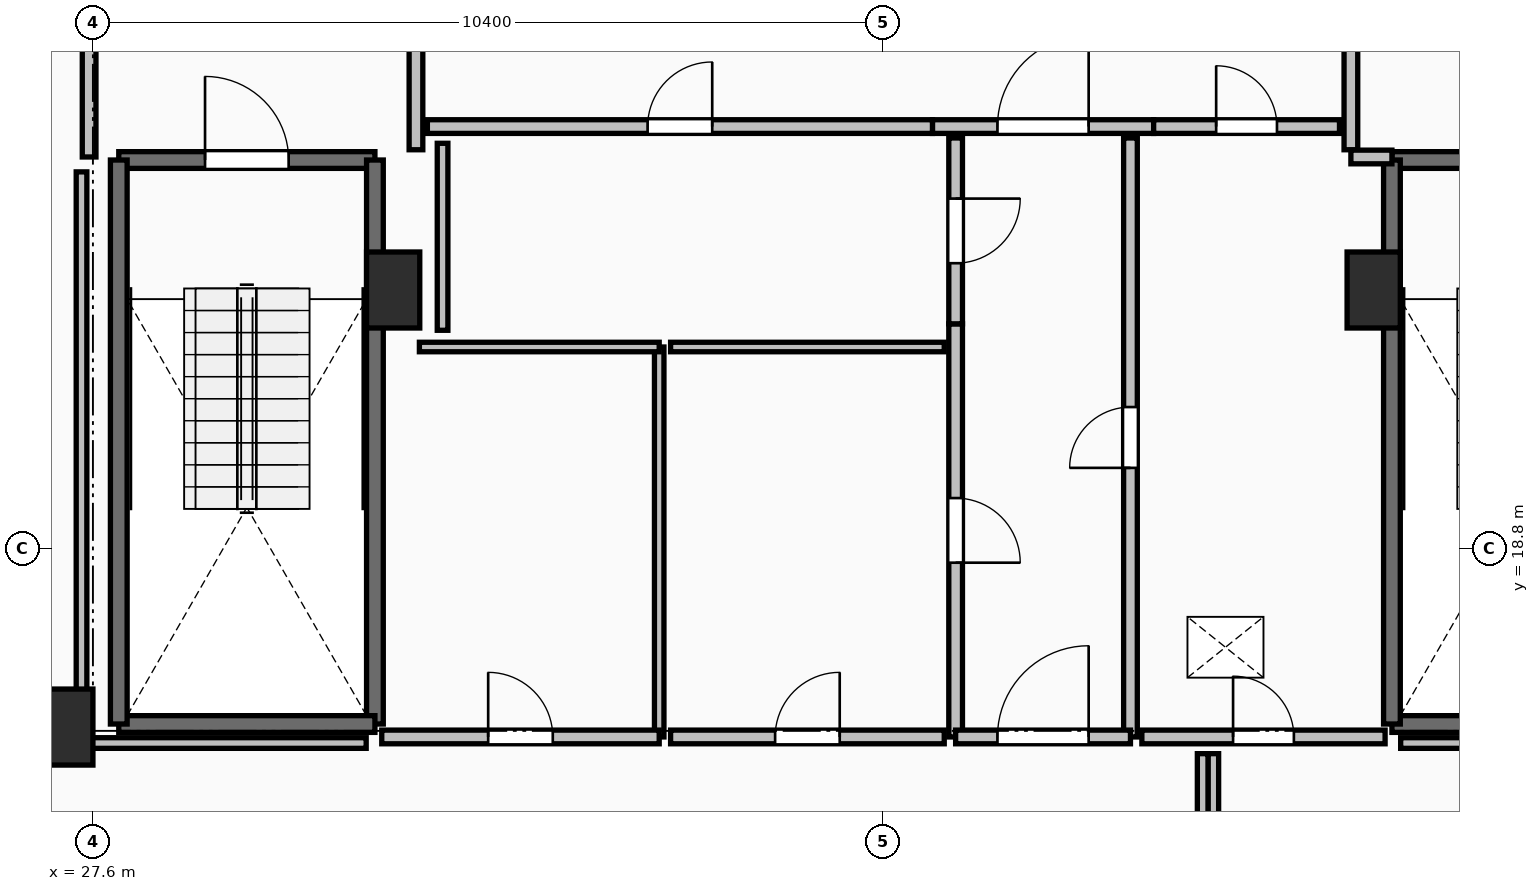
"""IFC4 building model, lengths in metres.
Left out: names, types, materials, properties, quantities, classifications, styles, units other than length and angle.
Written with IfcOpenShell. Run it as: python <this file> out.ifc"""

import sys

from ifc_helpers import new_model, si_unit, direction, frame, frame_2d, origin, origin_2d, place, context, subcontext, project, spatial, rectangle, extrude, element, fill, save


model = new_model("IFC4")
c1 = context("Model", 3, precision=1e-05, world=origin(), true_north=direction((0.0, 1.0)))
c2 = subcontext(c1, "Body", "Model", "MODEL_VIEW")
j1 = project(units=[si_unit("LENGTHUNIT", "METRE"), si_unit("PLANEANGLEUNIT", "RADIAN")], contexts=[c1])
p1 = place(None, origin())
s1 = spatial("IfcSite", under=j1, at=p1, CompositionType="ELEMENT")
p2 = place(p1, origin())
s2 = spatial("IfcBuilding", under=s1, at=p2, CompositionType="ELEMENT")
p3 = place(p2, frame((0.0, 0.0, 262.65)))
s3 = spatial("IfcBuildingStorey", under=s2, at=p3, CompositionType="ELEMENT", Elevation=262.65)
for number, where, z_axis, x_axis in (
    (1, (27.25, 16.45, 0.0), (0.0, 0.0, 1.0), (1.0, 0.0, 0.0)),
    (2, (31.55, 22.2, 0.0), (0.0, 0.0, 1.0), (1.0, 0.0, 0.0)),
    (3, (44.45, 22.2, 0.0), (0.0, 0.0, 1.0), (1.0, 0.0, 0.0)),
):
    element("IfcColumn", number, at=place(p3, frame(where, z_axis=z_axis, x_axis=x_axis)), inside=s3, PredefinedType="PILASTER", context=c2, shape_type="SweptSolid", body=[
        extrude(rectangle(XDim=0.7, YDim=1.0, at=origin_2d()), origin(), (0.0, 0.0, 1.0), 3.55),
    ])
p4 = place(p3, frame((27.94, 23.91, 0.0), z_axis=(0.0, 0.0, 1.0), x_axis=(1.0, 0.0, 0.0)))
e4 = element("IfcWall", 4, at=p4, inside=s3, PredefinedType="SOLIDWALL", context=c2, shape_type="SweptSolid", body=[
    extrude(rectangle(XDim=3.37, YDim=0.22, at=frame_2d((1.685, 0.0))), origin(), (0.0, 0.0, 1.0), 3.29),
])
p5 = place(p4, frame((1.135, 0.0, 0.0)))
e5 = element("IfcOpeningElement", 5, at=p5, cuts=e4, PredefinedType="OPENING", context=c2, shape_type="SweptSolid", body=[
    extrude(rectangle(XDim=1.1, YDim=2.15, at=frame_2d((0.55, 1.075))), frame((0.0, 0.125, 0.0), z_axis=(0.0, -1.0, 0.0), x_axis=(1.0, 0.0, 0.0)), (0.0, 0.0, 1.0), 0.25),
])
p6 = place(p3, frame((31.31, 23.91, 0.0), z_axis=(0.0, 0.0, 1.0), x_axis=(0.0, -1.0, 0.0)))
e6 = element("IfcWall", 6, at=p6, inside=s3, PredefinedType="SOLIDWALL", context=c2, shape_type="SweptSolid", body=[
    extrude(rectangle(XDim=7.42, YDim=0.22, at=frame_2d((3.71, 0.0))), origin(), (0.0, 0.0, 1.0), 3.29),
])
p7 = place(p3, frame((31.31, 16.49, 0.0), z_axis=(0.0, 0.0, 1.0), x_axis=(-1.0, 0.0, 0.0)))
e7 = element("IfcWall", 7, at=p7, inside=s3, PredefinedType="SOLIDWALL", context=c2, shape_type="SweptSolid", body=[
    extrude(rectangle(XDim=3.37, YDim=0.22, at=frame_2d((1.685, 0.0))), origin(), (0.0, 0.0, 1.0), 3.29),
])
p8 = place(p3, frame((27.94, 16.49, 0.0), z_axis=(0.0, 0.0, 1.0), x_axis=(0.0, 1.0, 0.0)))
e8 = element("IfcWall", 8, at=p8, inside=s3, PredefinedType="SOLIDWALL", context=c2, shape_type="SweptSolid", body=[
    extrude(rectangle(XDim=7.42, YDim=0.22, at=frame_2d((3.71, 0.0))), origin(), (0.0, 0.0, 1.0), 3.29),
])
p9 = place(p3, frame((44.69, 23.91, 0.0), z_axis=(0.0, 0.0, 1.0), x_axis=(1.0, 0.0, 0.0)))
e9 = element("IfcWall", 9, at=p9, inside=s3, PredefinedType="SOLIDWALL", context=c2, shape_type="SweptSolid", body=[
    extrude(rectangle(XDim=3.37, YDim=0.22, at=frame_2d((1.685, 0.0))), origin(), (0.0, 0.0, 1.0), 3.29),
])
p10 = place(p9, frame((1.135, 0.0, 0.0)))
e10 = element("IfcOpeningElement", 10, at=p10, cuts=e9, PredefinedType="OPENING", context=c2, shape_type="SweptSolid", body=[
    extrude(rectangle(XDim=1.1, YDim=2.15, at=frame_2d((0.55, 1.075))), frame((0.0, 0.125, 0.0), z_axis=(0.0, -1.0, 0.0), x_axis=(1.0, 0.0, 0.0)), (0.0, 0.0, 1.0), 0.25),
])
p11 = place(p3, frame((48.06, 16.49, 0.0), z_axis=(0.0, 0.0, 1.0), x_axis=(-1.0, 0.0, 0.0)))
e11 = element("IfcWall", 11, at=p11, inside=s3, PredefinedType="SOLIDWALL", context=c2, shape_type="SweptSolid", body=[
    extrude(rectangle(XDim=3.37, YDim=0.22, at=frame_2d((1.685, 0.0))), origin(), (0.0, 0.0, 1.0), 3.29),
])
p12 = place(p3, frame((44.69, 16.49, 0.0), z_axis=(0.0, 0.0, 1.0), x_axis=(0.0, 1.0, 0.0)))
e12 = element("IfcWall", 12, at=p12, inside=s3, PredefinedType="SOLIDWALL", context=c2, shape_type="SweptSolid", body=[
    extrude(rectangle(XDim=7.42, YDim=0.22, at=frame_2d((3.71, 0.0))), origin(), (0.0, 0.0, 1.0), 3.29),
])
p13 = place(p3, frame((31.85, 24.045, 0.0), z_axis=(0.0, 0.0, 1.0), x_axis=(0.0, 1.0, 0.0)))
e13 = element("IfcWall", 13, at=p13, inside=s3, PredefinedType="PARTITIONING", context=c2, shape_type="SweptSolid", body=[
    extrude(rectangle(XDim=3.91, YDim=0.18, at=frame_2d((1.955, 0.0))), origin(), (0.0, 0.0, 1.0), 3.29),
])
p14 = place(p13, frame((1.355, 0.0, 0.0)))
e14 = element("IfcOpeningElement", 14, at=p14, cuts=e13, PredefinedType="OPENING", context=c2, shape_type="SweptSolid", body=[
    extrude(rectangle(XDim=1.2, YDim=2.15, at=frame_2d((0.6, 1.075))), frame((0.0, 0.105, 0.0), z_axis=(0.0, -1.0, 0.0), x_axis=(1.0, 0.0, 0.0)), (0.0, 0.0, 1.0), 0.21),
])
p15 = place(p3, frame((27.55, 28.0, 0.0), z_axis=(0.0, 0.0, 1.0), x_axis=(0.0, -1.0, 0.0)))
e15 = element("IfcWall", 15, at=p15, inside=s3, PredefinedType="PARTITIONING", context=c2, shape_type="SweptSolid", body=[
    extrude(rectangle(XDim=4.05, YDim=0.18, at=frame_2d((2.025, 0.0))), origin(), (0.0, 0.0, 1.0), 3.29),
])
p16 = place(p15, frame((1.425, 0.0, 0.0)))
e16 = element("IfcOpeningElement", 16, at=p16, cuts=e15, PredefinedType="OPENING", context=c2, shape_type="SweptSolid", body=[
    extrude(rectangle(XDim=1.2, YDim=2.15, at=frame_2d((0.6, 1.075))), frame((0.0, 0.105, 0.0), z_axis=(0.0, -1.0, 0.0), x_axis=(1.0, 0.0, 0.0)), (0.0, 0.0, 1.0), 0.21),
])
p17 = place(p3, frame((44.15, 27.955, 0.0), z_axis=(0.0, 0.0, 1.0), x_axis=(0.0, -1.0, 0.0)))
e17 = element("IfcWall", 17, at=p17, inside=s3, PredefinedType="PARTITIONING", context=c2, shape_type="SweptSolid", body=[
    extrude(rectangle(XDim=3.91, YDim=0.18, at=frame_2d((1.955, 0.0))), origin(), (0.0, 0.0, 1.0), 3.29),
])
p18 = place(p17, frame((1.355, 0.0, 0.0)))
e18 = element("IfcOpeningElement", 18, at=p18, cuts=e17, PredefinedType="OPENING", context=c2, shape_type="SweptSolid", body=[
    extrude(rectangle(XDim=1.2, YDim=2.15, at=frame_2d((0.6, 1.075))), frame((0.0, 0.105, 0.0), z_axis=(0.0, -1.0, 0.0), x_axis=(1.0, 0.0, 0.0)), (0.0, 0.0, 1.0), 0.21),
])
p19 = place(p3, frame((44.15, 23.95, 0.0), z_axis=(0.0, 0.0, 1.0), x_axis=(1.0, 0.0, 0.0)))
e19 = element("IfcWall", 19, at=p19, inside=s3, PredefinedType="PARTITIONING", context=c2, shape_type="SweptSolid", body=[
    extrude(rectangle(XDim=0.54, YDim=0.18, at=frame_2d((0.27, 0.0))), origin(), (0.0, 0.0, 1.0), 3.29),
])
p20 = place(p3, frame((38.645, 24.35, 0.0), z_axis=(0.0, 0.0, 1.0), x_axis=(1.0, 0.0, 0.0)))
e20 = element("IfcWall", 20, at=p20, inside=s3, PredefinedType="PARTITIONING", context=c2, shape_type="SweptSolid", body=[
    extrude(rectangle(XDim=2.91, YDim=0.18, at=frame_2d((1.455, 0.0))), origin(), (0.0, 0.0, 1.0), 3.29),
])
p21 = place(p20, frame((0.855, 0.0, 0.0)))
e21 = element("IfcOpeningElement", 21, at=p21, cuts=e20, PredefinedType="OPENING", context=c2, shape_type="SweptSolid", body=[
    extrude(rectangle(XDim=1.2, YDim=2.15, at=frame_2d((0.6, 1.075))), frame((0.0, 0.105, 0.0), z_axis=(0.0, -1.0, 0.0), x_axis=(1.0, 0.0, 0.0)), (0.0, 0.0, 1.0), 0.21),
])
p22 = place(p3, frame((41.555, 24.35, 0.0), z_axis=(0.0, 0.0, 1.0), x_axis=(1.0, 0.0, 0.0)))
e22 = element("IfcWall", 22, at=p22, inside=s3, PredefinedType="PARTITIONING", context=c2, shape_type="SweptSolid", body=[
    extrude(rectangle(XDim=2.445, YDim=0.18, at=frame_2d((1.223, 0.0))), origin(), (0.0, 0.0, 1.0), 3.29),
])
p23 = place(p22, frame((0.823, 0.0, 0.0)))
e23 = element("IfcOpeningElement", 23, at=p23, cuts=e22, PredefinedType="OPENING", context=c2, shape_type="SweptSolid", body=[
    extrude(rectangle(XDim=0.8, YDim=2.05, at=frame_2d((0.4, 1.025))), frame((0.0, 0.105, 0.0), z_axis=(0.0, -1.0, 0.0), x_axis=(1.0, 0.0, 0.0)), (0.0, 0.0, 1.0), 0.21),
])
p24 = place(p3, frame((32.0, 24.35, 0.0), z_axis=(0.0, 0.0, 1.0), x_axis=(1.0, 0.0, 0.0)))
e24 = element("IfcWall", 24, at=p24, inside=s3, PredefinedType="PARTITIONING", context=c2, shape_type="SweptSolid", body=[
    extrude(rectangle(XDim=6.645, YDim=0.18, at=frame_2d((3.323, 0.0))), origin(), (0.0, 0.0, 1.0), 3.29),
])
p25 = place(p24, frame((2.897, 0.0, 0.0)))
e25 = element("IfcOpeningElement", 25, at=p25, cuts=e24, PredefinedType="OPENING", context=c2, shape_type="SweptSolid", body=[
    extrude(rectangle(XDim=0.85, YDim=2.1, at=frame_2d((0.425, 1.05))), frame((0.0, 0.105, 0.0), z_axis=(0.0, -1.0, 0.0), x_axis=(1.0, 0.0, 0.0)), (0.0, 0.0, 1.0), 0.21),
])
p26 = place(p3, frame((41.25, 16.32, 0.0), z_axis=(0.0, 0.0, 1.0), x_axis=(0.0, 1.0, 0.0)))
e26 = element("IfcWall", 26, at=p26, inside=s3, PredefinedType="PARTITIONING", context=c2, shape_type="SweptSolid", body=[
    extrude(rectangle(XDim=7.88, YDim=0.18, at=frame_2d((3.94, 0.0))), origin(), (0.0, 0.0, 1.0), 2.482),
])
p27 = place(p26, frame((3.54, 0.0, 0.0)))
e27 = element("IfcOpeningElement", 27, at=p27, cuts=e26, PredefinedType="OPENING", context=c2, shape_type="SweptSolid", body=[
    extrude(rectangle(XDim=0.8, YDim=2.05, at=frame_2d((0.4, 1.025))), frame((0.0, 0.105, 0.0), z_axis=(0.0, -1.0, 0.0), x_axis=(1.0, 0.0, 0.0)), (0.0, 0.0, 1.0), 0.21),
])
p28 = place(p3, frame((38.95, 21.755, 0.0), z_axis=(0.0, 0.0, 1.0), x_axis=(0.0, -1.0, 0.0)))
e28 = element("IfcWall", 28, at=p28, inside=s3, PredefinedType="PARTITIONING", context=c2, shape_type="SweptSolid", body=[
    extrude(rectangle(XDim=5.435, YDim=0.18, at=frame_2d((2.717, 0.0))), origin(), (0.0, 0.0, 1.0), 3.29),
])
p29 = place(p28, frame((2.292, 0.0, 0.0)))
e29 = element("IfcOpeningElement", 29, at=p29, cuts=e28, PredefinedType="OPENING", context=c2, shape_type="SweptSolid", body=[
    extrude(rectangle(XDim=0.85, YDim=2.1, at=frame_2d((0.425, 1.05))), frame((0.0, 0.105, 0.0), z_axis=(0.0, -1.0, 0.0), x_axis=(1.0, 0.0, 0.0)), (0.0, 0.0, 1.0), 0.21),
])
p30 = place(p3, frame((38.95, 24.2, 0.0), z_axis=(0.0, 0.0, 1.0), x_axis=(0.0, -1.0, 0.0)))
e30 = element("IfcWall", 30, at=p30, inside=s3, PredefinedType="PARTITIONING", context=c2, shape_type="SweptSolid", body=[
    extrude(rectangle(XDim=2.445, YDim=0.18, at=frame_2d((1.223, 0.0))), origin(), (0.0, 0.0, 1.0), 2.482),
])
p31 = place(p30, frame((0.798, 0.0, 0.0)))
e31 = element("IfcOpeningElement", 31, at=p31, cuts=e30, PredefinedType="OPENING", context=c2, shape_type="SweptSolid", body=[
    extrude(rectangle(XDim=0.85, YDim=2.1, at=frame_2d((0.425, 1.05))), frame((0.0, 0.105, 0.0), z_axis=(0.0, -1.0, 0.0), x_axis=(1.0, 0.0, 0.0)), (0.0, 0.0, 1.0), 0.21),
])
p32 = place(p3, frame((38.95, 16.32, 0.0), z_axis=(0.0, 0.0, 1.0), x_axis=(1.0, 0.0, 0.0)))
e32 = element("IfcWall", 32, at=p32, inside=s3, PredefinedType="PARTITIONING", context=c2, shape_type="SweptSolid", body=[
    extrude(rectangle(XDim=2.3, YDim=0.18, at=frame_2d((1.15, 0.0))), origin(), (0.0, 0.0, 1.0), 3.29),
])
p33 = place(p32, frame((0.55, 0.0, 0.0)))
e33 = element("IfcOpeningElement", 33, at=p33, cuts=e32, PredefinedType="OPENING", context=c2, shape_type="SweptSolid", body=[
    extrude(rectangle(XDim=1.2, YDim=2.15, at=frame_2d((0.6, 1.075))), frame((0.0, 0.105, 0.0), z_axis=(0.0, -1.0, 0.0), x_axis=(1.0, 0.0, 0.0)), (0.0, 0.0, 1.0), 0.21),
])
p34 = place(p3, frame((41.4, 16.32, 0.0), z_axis=(0.0, 0.0, 1.0), x_axis=(1.0, 0.0, 0.0)))
e34 = element("IfcWall", 34, at=p34, inside=s3, PredefinedType="PARTITIONING", context=c2, shape_type="SweptSolid", body=[
    extrude(rectangle(XDim=3.2, YDim=0.18, at=frame_2d((1.6, 0.0))), origin(), (0.0, 0.0, 1.0), 3.29),
])
p35 = place(p34, frame((1.2, 0.0, 0.0)))
e35 = element("IfcOpeningElement", 35, at=p35, cuts=e34, PredefinedType="OPENING", context=c2, shape_type="SweptSolid", body=[
    extrude(rectangle(XDim=0.8, YDim=2.05, at=frame_2d((0.4, 1.025))), frame((0.0, 0.105, 0.0), z_axis=(0.0, -1.0, 0.0), x_axis=(1.0, 0.0, 0.0)), (0.0, 0.0, 1.0), 0.21),
])
p36 = place(p3, frame((35.05, 16.32, 0.0), z_axis=(0.0, 0.0, 1.0), x_axis=(0.0, 1.0, 0.0)))
e36 = element("IfcWall", 36, at=p36, inside=s3, PredefinedType="PARTITIONING", context=c2, shape_type="SweptSolid", body=[
    extrude(rectangle(XDim=5.13, YDim=0.125, at=frame_2d((2.565, 0.0))), origin(), (0.0, 0.0, 1.0), 3.29),
])
p37 = place(p3, frame((35.05, 21.45, 0.0), z_axis=(0.0, 0.0, 1.0), x_axis=(-1.0, 0.0, 0.0)))
e37 = element("IfcWall", 37, at=p37, inside=s3, PredefinedType="PARTITIONING", context=c2, shape_type="SweptSolid", body=[
    extrude(rectangle(XDim=3.155, YDim=0.125, at=frame_2d((1.578, 0.0))), origin(), (0.0, 0.0, 1.0), 3.29),
])
p38 = place(p3, frame((31.4, 16.32, 0.0), z_axis=(0.0, 0.0, 1.0), x_axis=(1.0, 0.0, 0.0)))
e38 = element("IfcWall", 38, at=p38, inside=s3, PredefinedType="PARTITIONING", context=c2, shape_type="SweptSolid", body=[
    extrude(rectangle(XDim=3.65, YDim=0.18, at=frame_2d((1.825, 0.0))), origin(), (0.0, 0.0, 1.0), 3.29),
])
p39 = place(p38, frame((1.4, 0.0, 0.0)))
e39 = element("IfcOpeningElement", 39, at=p39, cuts=e38, PredefinedType="OPENING", context=c2, shape_type="SweptSolid", body=[
    extrude(rectangle(XDim=0.85, YDim=2.1, at=frame_2d((0.425, 1.05))), frame((0.0, 0.105, 0.0), z_axis=(0.0, -1.0, 0.0), x_axis=(1.0, 0.0, 0.0)), (0.0, 0.0, 1.0), 0.21),
])
p40 = place(p3, frame((38.8, 21.45, 0.0), z_axis=(0.0, 0.0, 1.0), x_axis=(-1.0, 0.0, 0.0)))
e40 = element("IfcWall", 40, at=p40, inside=s3, PredefinedType="PARTITIONING", context=c2, shape_type="SweptSolid", body=[
    extrude(rectangle(XDim=3.6, YDim=0.125, at=frame_2d((1.8, 0.0))), origin(), (0.0, 0.0, 1.0), 3.29),
])
p41 = place(p3, frame((35.2, 16.32, 0.0), z_axis=(0.0, 0.0, 1.0), x_axis=(1.0, 0.0, 0.0)))
e41 = element("IfcWall", 41, at=p41, inside=s3, PredefinedType="PARTITIONING", context=c2, shape_type="SweptSolid", body=[
    extrude(rectangle(XDim=3.6, YDim=0.18, at=frame_2d((1.8, 0.0))), origin(), (0.0, 0.0, 1.0), 3.29),
])
p42 = place(p41, frame((1.375, 0.0, 0.0)))
e42 = element("IfcOpeningElement", 42, at=p42, cuts=e41, PredefinedType="OPENING", context=c2, shape_type="SweptSolid", body=[
    extrude(rectangle(XDim=0.85, YDim=2.1, at=frame_2d((0.425, 1.05))), frame((0.0, 0.105, 0.0), z_axis=(0.0, -1.0, 0.0), x_axis=(1.0, 0.0, 0.0)), (0.0, 0.0, 1.0), 0.21),
])
p43 = place(p3, frame((32.2, 24.13, 0.0), z_axis=(0.0, 0.0, 1.0), x_axis=(0.0, -1.0, 0.0)))
e43 = element("IfcWall", 43, at=p43, inside=s3, PredefinedType="PARTITIONING", context=c2, shape_type="SweptSolid", body=[
    extrude(rectangle(XDim=2.46, YDim=0.14, at=frame_2d((1.23, 0.0))), origin(), (0.0, 0.0, 1.0), 2.482),
])
p44 = place(p3, frame((42.34, 14.25, 0.0), z_axis=(0.0, 0.0, 1.0), x_axis=(0.0, 1.0, 0.0)))
e44 = element("IfcWall", 44, at=p44, inside=s3, PredefinedType="PARTITIONING", context=c2, shape_type="SweptSolid", body=[
    extrude(rectangle(XDim=1.85, YDim=0.14, at=frame_2d((0.925, 0.0))), origin(), (0.0, 0.0, 1.0), 3.29),
])
p45 = place(p3, frame((44.805, 16.24, 0.0), z_axis=(0.0, 0.0, 1.0), x_axis=(1.0, 0.0, 0.0)))
e45 = element("IfcWall", 45, at=p45, inside=s3, PredefinedType="PARTITIONING", context=c2, shape_type="SweptSolid", body=[
    extrude(rectangle(XDim=3.745, YDim=0.14, at=frame_2d((1.873, 0.0))), origin(), (0.0, 0.0, 1.0), 2.482),
])
p46 = place(p3, frame((27.45, 23.754, 0.0), z_axis=(0.0, 0.0, 1.0), x_axis=(0.0, -1.0, 0.0)))
e46 = element("IfcWall", 46, at=p46, inside=s3, PredefinedType="PARTITIONING", context=c2, shape_type="SweptSolid", body=[
    extrude(rectangle(XDim=7.514, YDim=0.14, at=frame_2d((3.757, 0.0))), origin(), (0.0, 0.0, 1.0), 2.482),
])
p47 = place(p3, frame((27.45, 16.24, 0.0), z_axis=(0.0, 0.0, 1.0), x_axis=(1.0, 0.0, 0.0)))
e47 = element("IfcWall", 47, at=p47, inside=s3, PredefinedType="PARTITIONING", context=c2, shape_type="SweptSolid", body=[
    extrude(rectangle(XDim=3.745, YDim=0.14, at=frame_2d((1.873, 0.0))), origin(), (0.0, 0.0, 1.0), 2.482),
])
p48 = place(p3, frame((42.2, 16.1, 0.0), z_axis=(0.0, 0.0, 1.0), x_axis=(0.0, -1.0, 0.0)))
e48 = element("IfcWall", 48, at=p48, inside=s3, PredefinedType="PARTITIONING", context=c2, shape_type="SweptSolid", body=[
    extrude(rectangle(XDim=1.85, YDim=0.14, at=frame_2d((0.925, 0.0))), origin(), (0.0, 0.0, 1.0), 3.29),
])
p49 = place(p5, origin())
e49 = element("IfcDoor", 49, at=p49, inside=s3, OperationType="SINGLE_SWING_LEFT", PredefinedType="DOOR", context=c2, shape_type="SweptSolid", body=[
    extrude(rectangle(XDim=1.1, YDim=2.15, at=frame_2d((0.55, 1.075))), frame((0.0, 0.025, 0.0), z_axis=(0.0, -1.0, 0.0), x_axis=(1.0, 0.0, 0.0)), (0.0, 0.0, 1.0), 0.05),
])
fill(e5, e49)
p50 = place(p21, origin())
e50 = element("IfcDoor", 50, at=p50, inside=s3, OperationType="SINGLE_SWING_RIGHT", PredefinedType="DOOR", context=c2, shape_type="SweptSolid", body=[
    extrude(rectangle(XDim=1.2, YDim=2.15, at=frame_2d((0.6, 1.075))), frame((0.0, 0.025, 0.0), z_axis=(0.0, -1.0, 0.0), x_axis=(1.0, 0.0, 0.0)), (0.0, 0.0, 1.0), 0.05),
])
fill(e21, e50)
p51 = place(p23, origin())
e51 = element("IfcDoor", 51, at=p51, inside=s3, OperationType="SINGLE_SWING_LEFT", PredefinedType="DOOR", context=c2, shape_type="SweptSolid", body=[
    extrude(rectangle(XDim=0.8, YDim=2.05, at=frame_2d((0.4, 1.025))), frame((0.0, 0.025, 0.0), z_axis=(0.0, -1.0, 0.0), x_axis=(1.0, 0.0, 0.0)), (0.0, 0.0, 1.0), 0.05),
])
fill(e23, e51)
p52 = place(p25, origin())
e52 = element("IfcDoor", 52, at=p52, inside=s3, OperationType="SINGLE_SWING_RIGHT", PredefinedType="DOOR", context=c2, shape_type="SweptSolid", body=[
    extrude(rectangle(XDim=0.85, YDim=2.1, at=frame_2d((0.425, 1.05))), frame((0.0, 0.025, 0.0), z_axis=(0.0, -1.0, 0.0), x_axis=(1.0, 0.0, 0.0)), (0.0, 0.0, 1.0), 0.05),
])
fill(e25, e52)
p53 = place(p27, origin())
e53 = element("IfcDoor", 53, at=p53, inside=s3, OperationType="SINGLE_SWING_LEFT", PredefinedType="DOOR", context=c2, shape_type="SweptSolid", body=[
    extrude(rectangle(XDim=0.8, YDim=2.05, at=frame_2d((0.4, 1.025))), frame((0.0, 0.025, 0.0), z_axis=(0.0, -1.0, 0.0), x_axis=(1.0, 0.0, 0.0)), (0.0, 0.0, 1.0), 0.05),
])
fill(e27, e53)
p54 = place(p29, origin())
e54 = element("IfcDoor", 54, at=p54, inside=s3, OperationType="SINGLE_SWING_RIGHT", PredefinedType="DOOR", context=c2, shape_type="SweptSolid", body=[
    extrude(rectangle(XDim=0.85, YDim=2.1, at=frame_2d((0.425, 1.05))), frame((0.0, 0.025, 0.0), z_axis=(0.0, -1.0, 0.0), x_axis=(1.0, 0.0, 0.0)), (0.0, 0.0, 1.0), 0.05),
])
fill(e29, e54)
p55 = place(p31, origin())
e55 = element("IfcDoor", 55, at=p55, inside=s3, OperationType="SINGLE_SWING_LEFT", PredefinedType="DOOR", context=c2, shape_type="SweptSolid", body=[
    extrude(rectangle(XDim=0.85, YDim=2.1, at=frame_2d((0.425, 1.05))), frame((0.0, 0.025, 0.0), z_axis=(0.0, -1.0, 0.0), x_axis=(1.0, 0.0, 0.0)), (0.0, 0.0, 1.0), 0.05),
])
fill(e31, e55)
p56 = place(p33, origin())
e56 = element("IfcDoor", 56, at=p56, inside=s3, OperationType="SINGLE_SWING_RIGHT", PredefinedType="DOOR", context=c2, shape_type="SweptSolid", body=[
    extrude(rectangle(XDim=1.2, YDim=2.15, at=frame_2d((0.6, 1.075))), frame((0.0, 0.025, 0.0), z_axis=(0.0, -1.0, 0.0), x_axis=(1.0, 0.0, 0.0)), (0.0, 0.0, 1.0), 0.05),
])
fill(e33, e56)
p57 = place(p35, origin())
e57 = element("IfcDoor", 57, at=p57, inside=s3, OperationType="SINGLE_SWING_LEFT", PredefinedType="DOOR", context=c2, shape_type="SweptSolid", body=[
    extrude(rectangle(XDim=0.8, YDim=2.05, at=frame_2d((0.4, 1.025))), frame((0.0, 0.025, 0.0), z_axis=(0.0, -1.0, 0.0), x_axis=(1.0, 0.0, 0.0)), (0.0, 0.0, 1.0), 0.05),
])
fill(e35, e57)
p58 = place(p39, origin())
e58 = element("IfcDoor", 58, at=p58, inside=s3, OperationType="SINGLE_SWING_LEFT", PredefinedType="DOOR", context=c2, shape_type="SweptSolid", body=[
    extrude(rectangle(XDim=0.85, YDim=2.1, at=frame_2d((0.425, 1.05))), frame((0.0, 0.025, 0.0), z_axis=(0.0, -1.0, 0.0), x_axis=(1.0, 0.0, 0.0)), (0.0, 0.0, 1.0), 0.05),
])
fill(e39, e58)
p59 = place(p42, origin())
e59 = element("IfcDoor", 59, at=p59, inside=s3, OperationType="SINGLE_SWING_RIGHT", PredefinedType="DOOR", context=c2, shape_type="SweptSolid", body=[
    extrude(rectangle(XDim=0.85, YDim=2.1, at=frame_2d((0.425, 1.05))), frame((0.0, 0.025, 0.0), z_axis=(0.0, -1.0, 0.0), x_axis=(1.0, 0.0, 0.0)), (0.0, 0.0, 1.0), 0.05),
])
fill(e42, e59)
save(model, sys.argv[1])
